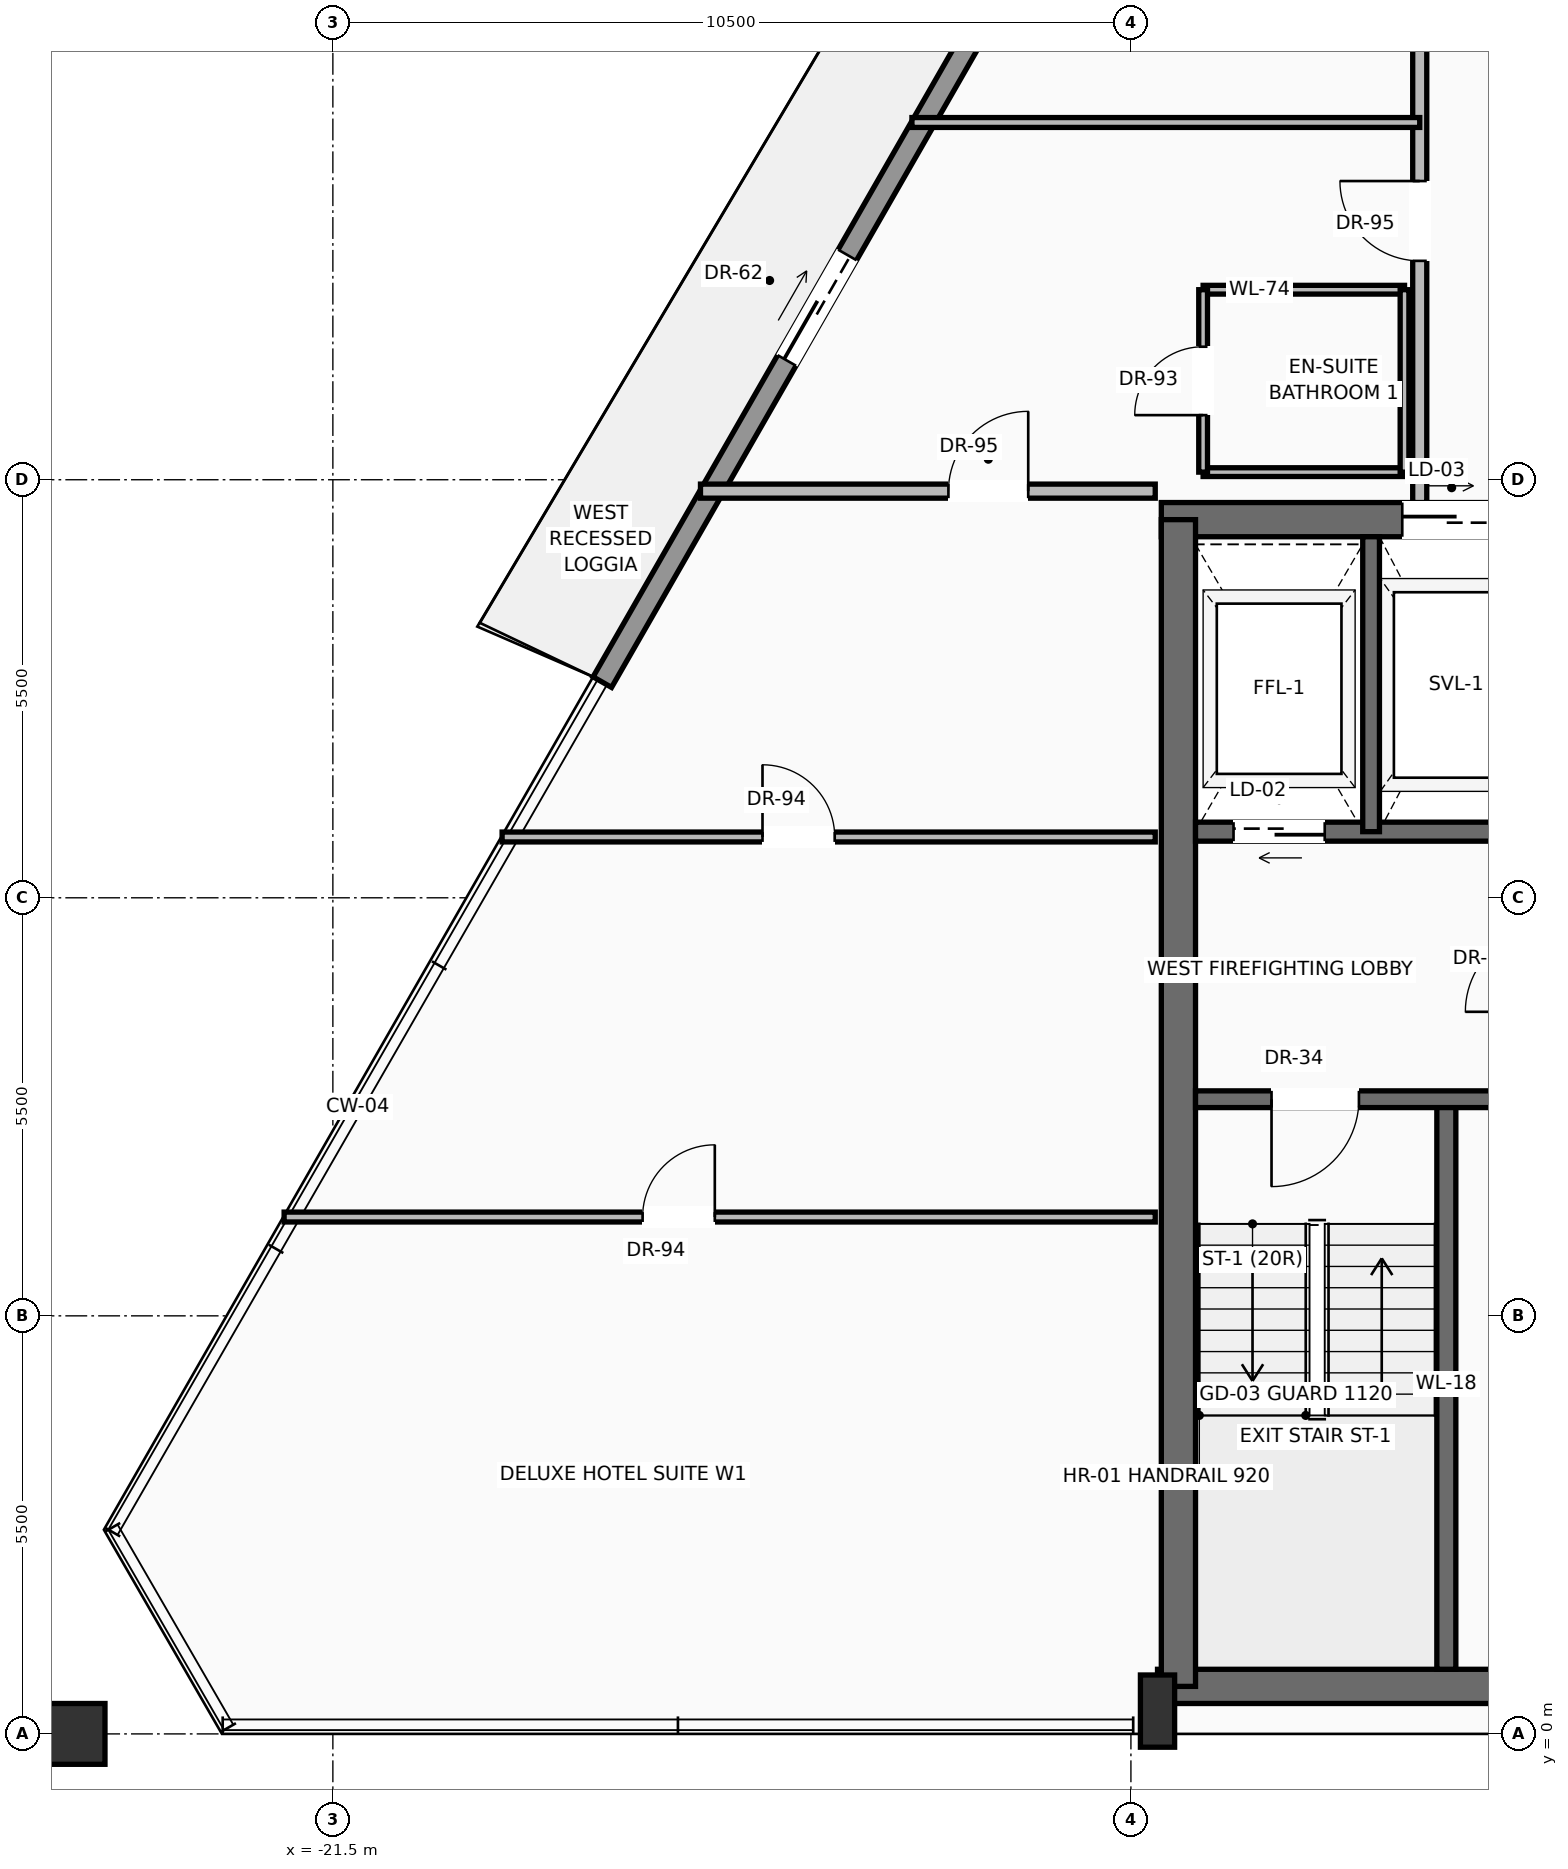
"""IFC4 building model, lengths in metres.
Left out: names, types, materials, properties, quantities, classifications, styles, units other than length and angle.
Written with IfcOpenShell. Run it as: python <this file> out.ifc"""

import sys

from ifc_helpers import new_model, si_unit, direction, frame, frame_2d, origin, origin_2d, place, context, subcontext, project, spatial, rectangle, hollow_rectangle, extrude, source, transform, mapped, element, fill, save


model = new_model("IFC4")
c1 = context("Model", 3, precision=1e-05, world=origin(), true_north=direction((0.0, 1.0)))
c2 = subcontext(c1, "Body", "Model", "MODEL_VIEW")
j1 = project(units=[si_unit("LENGTHUNIT", "METRE"), si_unit("PLANEANGLEUNIT", "RADIAN")], contexts=[c1])
p1 = place(None, origin())
s1 = spatial("IfcSite", under=j1, at=p1, CompositionType="ELEMENT")
p2 = place(p1, origin())
s2 = spatial("IfcBuilding", under=s1, at=p2, CompositionType="ELEMENT")
p3 = place(p2, frame((0.0, 0.0, 293.7)))
s3 = spatial("IfcBuildingStorey", under=s2, at=p3, CompositionType="ELEMENT", Elevation=293.7)
p4 = place(p3, frame((-10.65, 0.625, 0.0), z_axis=(0.0, 0.0, 1.0), x_axis=(1.0, 0.0, 0.0)))
e1 = element("IfcWall", 1, at=p4, inside=s3, PredefinedType="SHEAR", context=c2, shape_type="SweptSolid", body=[
    extrude(rectangle(XDim=21.3, YDim=0.45, at=frame_2d((10.65, 0.0))), origin(), (0.0, 0.0, 1.0), 3.24),
])
p5 = place(p3, frame((-10.6, 15.975, 0.0), z_axis=(0.0, 0.0, 1.0), x_axis=(1.0, 0.0, 0.0)))
e2 = element("IfcWall", 2, at=p5, inside=s3, PredefinedType="SHEAR", context=c2, shape_type="SweptSolid", body=[
    extrude(rectangle(XDim=21.2, YDim=0.45, at=frame_2d((10.6, 0.0))), origin(), (0.0, 0.0, 1.0), 3.24),
])
p6 = place(p5, frame((3.17, 0.0, 0.0)))
e3 = element("IfcOpeningElement", 3, at=p6, cuts=e2, PredefinedType="OPENING", context=c2, shape_type="SweptSolid", body=[
    extrude(rectangle(XDim=1.3, YDim=2.3, at=frame_2d((0.65, 1.15))), frame((0.0, 0.235, 0.0), z_axis=(0.0, -1.0, 0.0), x_axis=(1.0, 0.0, 0.0)), (0.0, 0.0, 1.0), 0.47),
])
p7 = place(p5, frame((9.6, 0.0, 0.0)))
e4 = element("IfcOpeningElement", 4, at=p7, cuts=e2, PredefinedType="OPENING", context=c2, shape_type="SweptSolid", body=[
    extrude(rectangle(XDim=2.0, YDim=2.4, at=frame_2d((1.0, 1.2))), frame((0.0, 0.235, 0.0), z_axis=(0.0, -1.0, 0.0), x_axis=(1.0, 0.0, 0.0)), (0.0, 0.0, 1.0), 0.47),
])
p8 = place(p3, frame((-10.375, 0.625, 0.0), z_axis=(0.0, 0.0, 1.0), x_axis=(0.0, 1.0, 0.0)))
e5 = element("IfcWall", 5, at=p8, inside=s3, PredefinedType="SHEAR", context=c2, shape_type="SweptSolid", body=[
    extrude(rectangle(XDim=15.35, YDim=0.45, at=frame_2d((7.675, 0.0))), origin(), (0.0, 0.0, 1.0), 3.24),
])
m1 = source(origin(), c2, "Body", "SweptSolid", [
    extrude(rectangle(XDim=0.45, YDim=0.95, at=origin_2d()), origin(), (0.0, 0.0, 1.0), 3.45),
])
p9 = place(p3, frame((-10.65, 0.3, 0.0), z_axis=(0.0, 0.0, 1.0), x_axis=(1.0, 0.0, 0.0)))
e6 = element("IfcColumn", 6, at=p9, inside=s3, PredefinedType="PILASTER", context=c2, shape_type="MappedRepresentation", body=[
    mapped(m1, transform((0.0, 0.0, 0.0), scale=1.0)),
])
m2 = source(origin(), c2, "Body", "SweptSolid", [
    extrude(hollow_rectangle(XDim=0.8, YDim=0.8, WallThickness=0.04, at=origin_2d()), origin(), (0.0, 0.0, 1.0), 3.441),
])
p10 = place(p3, frame((-24.898, 0.0, 0.004), z_axis=(0.003050713012, 0.0, 0.999995346564), x_axis=(0.0, 1.0, 0.0)))
e7 = element("IfcColumn", 7, at=p10, inside=s3, PredefinedType="COLUMN", context=c2, shape_type="MappedRepresentation", body=[
    mapped(m2, transform((0.0, 0.0, 0.0), scale=1.0)),
])
m3 = source(origin(), c2, "Body", "SweptSolid", [
    extrude(hollow_rectangle(XDim=0.8, YDim=0.8, WallThickness=0.04, at=origin_2d()), origin(), (0.0, 0.0, 1.0), 3.442),
])
p11 = place(p3, frame((-25.74, 1.407, 0.004), z_axis=(0.013831591838, -0.016030460285, 0.999775830579), x_axis=(0.757124238774, 0.653270913986, 0.0)))
e8 = element("IfcColumn", 8, at=p11, inside=s3, PredefinedType="COLUMN", context=c2, shape_type="MappedRepresentation", body=[
    mapped(m3, transform((0.0, 0.0, 0.0), scale=1.0)),
])
p12 = place(p3, frame((-17.955, 13.837, 0.0), z_axis=(0.0, 0.0, 1.0), x_axis=(0.49757006288, 0.867423790616, 0.0)))
e9 = element("IfcWall", 9, at=p12, inside=s3, PredefinedType="SOLIDWALL", context=c2, shape_type="SweptSolid", body=[
    extrude(rectangle(XDim=20.328, YDim=0.28, at=frame_2d((10.164, 0.0))), origin(), (0.0, 0.0, 1.0), 2.82),
])
p13 = place(p12, frame((4.879, 0.0, 0.0)))
e10 = element("IfcOpeningElement", 10, at=p13, cuts=e9, PredefinedType="OPENING", context=c2, shape_type="SweptSolid", body=[
    extrude(rectangle(XDim=1.6, YDim=2.35, at=frame_2d((0.8, 1.175))), frame((0.0, 0.15, 0.0), z_axis=(0.0, -1.0, 0.0), x_axis=(1.0, 0.0, 0.0)), (0.0, 0.0, 1.0), 0.3),
])
p14 = place(p12, frame((13.823, 0.0, 0.9)))
e11 = element("IfcOpeningElement", 11, at=p14, cuts=e9, PredefinedType="OPENING", context=c2, shape_type="SweptSolid", body=[
    extrude(rectangle(XDim=1.55, YDim=1.75, at=frame_2d((0.775, 0.875))), frame((0.0, 0.15, 0.0), z_axis=(0.0, -1.0, 0.0), x_axis=(1.0, 0.0, 0.0)), (0.0, 0.0, 1.0), 0.3),
])
p15 = place(p3, frame((-6.85, 0.85, 0.0), z_axis=(0.0, 0.0, 1.0), x_axis=(0.0, 1.0, 0.0)))
e12 = element("IfcWall", 12, at=p15, inside=s3, PredefinedType="SOLIDWALL", context=c2, shape_type="SweptSolid", body=[
    extrude(rectangle(XDim=7.5, YDim=0.25, at=frame_2d((3.75, 0.0))), origin(), (0.0, 0.0, 1.0), 3.24),
])
p16 = place(p3, frame((-5.5, 8.35, 0.0), z_axis=(0.0, 0.0, 1.0), x_axis=(-1.0, 0.0, 0.0)))
e13 = element("IfcWall", 13, at=p16, inside=s3, PredefinedType="SOLIDWALL", context=c2, shape_type="SweptSolid", body=[
    extrude(rectangle(XDim=4.65, YDim=0.22, at=frame_2d((2.325, 0.0))), origin(), (0.0, 0.0, 1.0), 3.24),
])
p17 = place(p16, frame((2.5, 0.0, 0.0)))
e14 = element("IfcOpeningElement", 14, at=p17, cuts=e13, PredefinedType="OPENING", context=c2, shape_type="SweptSolid", body=[
    extrude(rectangle(XDim=1.15, YDim=2.2, at=frame_2d((0.575, 1.1))), frame((0.0, 0.12, 0.0), z_axis=(0.0, -1.0, 0.0), x_axis=(1.0, 0.0, 0.0)), (0.0, 0.0, 1.0), 0.24),
])
p18 = place(p3, frame((-5.5, 11.87, 0.0), z_axis=(0.0, 0.0, 1.0), x_axis=(-1.0, 0.0, 0.0)))
e15 = element("IfcWall", 15, at=p18, inside=s3, PredefinedType="SOLIDWALL", context=c2, shape_type="SweptSolid", body=[
    extrude(rectangle(XDim=4.65, YDim=0.25, at=frame_2d((2.325, 0.0))), origin(), (0.0, 0.0, 1.0), 3.24),
])
p19 = place(p18, frame((2.95, 0.0, 0.0)))
e16 = element("IfcOpeningElement", 16, at=p19, cuts=e15, PredefinedType="OPENING", context=c2, shape_type="SweptSolid", body=[
    extrude(rectangle(XDim=1.2, YDim=2.25, at=frame_2d((0.6, 1.125))), frame((0.0, 0.135, 0.0), z_axis=(0.0, -1.0, 0.0), x_axis=(1.0, 0.0, 0.0)), (0.0, 0.0, 1.0), 0.27),
])
p20 = place(p3, frame((-7.84, 11.87, 0.0), z_axis=(0.0, 0.0, 1.0), x_axis=(0.0, 1.0, 0.0)))
e17 = element("IfcWall", 17, at=p20, inside=s3, PredefinedType="SOLIDWALL", context=c2, shape_type="SweptSolid", body=[
    extrude(rectangle(XDim=3.88, YDim=0.22, at=frame_2d((1.94, 0.0))), origin(), (0.0, 0.0, 1.0), 3.24),
])
p21 = place(p3, frame((-7.2, 16.2, 0.0), z_axis=(0.0, 0.0, 1.0), x_axis=(0.0, 1.0, 0.0)))
e18 = element("IfcWall", 18, at=p21, inside=s3, PredefinedType="PARTITIONING", context=c2, shape_type="SweptSolid", body=[
    extrude(rectangle(XDim=10.4, YDim=0.185, at=frame_2d((5.2, 0.0))), origin(), (0.0, 0.0, 1.0), 3.232),
])
p22 = place(p21, frame((3.18, 0.0, 0.0)))
e19 = element("IfcOpeningElement", 19, at=p22, cuts=e18, PredefinedType="OPENING", context=c2, shape_type="SweptSolid", body=[
    extrude(rectangle(XDim=1.05, YDim=2.25, at=frame_2d((0.525, 1.125))), frame((0.0, 0.103, 0.0), z_axis=(0.0, -1.0, 0.0), x_axis=(1.0, 0.0, 0.0)), (0.0, 0.0, 1.0), 0.205),
])
p23 = place(p21, frame((7.712, 0.0, 0.0)))
e20 = element("IfcOpeningElement", 20, at=p23, cuts=e18, PredefinedType="OPENING", context=c2, shape_type="SweptSolid", body=[
    extrude(rectangle(XDim=1.05, YDim=2.25, at=frame_2d((0.525, 1.125))), frame((0.0, 0.103, 0.0), z_axis=(0.0, -1.0, 0.0), x_axis=(1.0, 0.0, 0.0)), (0.0, 0.0, 1.0), 0.205),
])
p24 = place(p3, frame((-16.663, 16.35, 0.0), z_axis=(0.0, 0.0, 1.0), x_axis=(1.0, 0.0, 0.0)))
e21 = element("IfcWall", 21, at=p24, inside=s3, PredefinedType="PARTITIONING", context=c2, shape_type="SweptSolid", body=[
    extrude(rectangle(XDim=5.983, YDim=0.185, at=frame_2d((2.992, 0.0))), origin(), (0.0, 0.0, 1.0), 3.232),
])
p25 = place(p24, frame((3.262, 0.0, 0.0)))
e22 = element("IfcOpeningElement", 22, at=p25, cuts=e21, PredefinedType="OPENING", context=c2, shape_type="SweptSolid", body=[
    extrude(rectangle(XDim=1.05, YDim=2.25, at=frame_2d((0.525, 1.125))), frame((0.0, 0.103, 0.0), z_axis=(0.0, -1.0, 0.0), x_axis=(1.0, 0.0, 0.0)), (0.0, 0.0, 1.0), 0.205),
])
p26 = place(p3, frame((-22.141, 6.8, 0.0), z_axis=(0.0, 0.0, 1.0), x_axis=(1.0, 0.0, 0.0)))
e23 = element("IfcWall", 23, at=p26, inside=s3, PredefinedType="PARTITIONING", context=c2, shape_type="SweptSolid", body=[
    extrude(rectangle(XDim=11.461, YDim=0.13, at=frame_2d((5.731, 0.0))), origin(), (0.0, 0.0, 1.0), 3.232),
])
p27 = place(p26, frame((4.717, 0.0, 0.0)))
e24 = element("IfcOpeningElement", 24, at=p27, cuts=e23, PredefinedType="OPENING", context=c2, shape_type="SweptSolid", body=[
    extrude(rectangle(XDim=0.95, YDim=2.2, at=frame_2d((0.475, 1.1))), frame((0.0, 0.075, 0.0), z_axis=(0.0, -1.0, 0.0), x_axis=(1.0, 0.0, 0.0)), (0.0, 0.0, 1.0), 0.15),
])
p28 = place(p3, frame((-19.273, 11.8, 0.0), z_axis=(0.0, 0.0, 1.0), x_axis=(1.0, 0.0, 0.0)))
e25 = element("IfcWall", 25, at=p28, inside=s3, PredefinedType="PARTITIONING", context=c2, shape_type="SweptSolid", body=[
    extrude(rectangle(XDim=8.593, YDim=0.13, at=frame_2d((4.297, 0.0))), origin(), (0.0, 0.0, 1.0), 3.232),
])
p29 = place(p28, frame((3.426, 0.0, 0.0)))
e26 = element("IfcOpeningElement", 26, at=p29, cuts=e25, PredefinedType="OPENING", context=c2, shape_type="SweptSolid", body=[
    extrude(rectangle(XDim=0.95, YDim=2.2, at=frame_2d((0.475, 1.1))), frame((0.0, 0.075, 0.0), z_axis=(0.0, -1.0, 0.0), x_axis=(1.0, 0.0, 0.0)), (0.0, 0.0, 1.0), 0.15),
])
for number, where, z_axis, x_axis in (
    (27, (-10.05, 16.6, 0.0), (0.0, 0.0, 1.0), (1.0, 0.0, 0.0)),
    (28, (-10.05, 19.0, 0.0), (0.0, 0.0, 1.0), (1.0, 0.0, 0.0)),
):
    element("IfcWall", number, at=place(p3, frame(where, z_axis=z_axis, x_axis=x_axis)), inside=s3, PredefinedType="PARTITIONING", context=c2, shape_type="SweptSolid", body=[
        extrude(rectangle(XDim=2.65, YDim=0.115, at=frame_2d((1.325, 0.0))), origin(), (0.0, 0.0, 1.0), 3.232),
    ])
p30 = place(p3, frame((-10.05, 16.6, 0.0), z_axis=(0.0, 0.0, 1.0), x_axis=(0.0, 1.0, 0.0)))
e29 = element("IfcWall", 29, at=p30, inside=s3, PredefinedType="PARTITIONING", context=c2, shape_type="SweptSolid", body=[
    extrude(rectangle(XDim=2.4, YDim=0.115, at=frame_2d((1.2, 0.0))), origin(), (0.0, 0.0, 1.0), 3.232),
])
p31 = place(p30, frame((0.75, 0.0, 0.0)))
e30 = element("IfcOpeningElement", 30, at=p31, cuts=e29, PredefinedType="OPENING", context=c2, shape_type="SweptSolid", body=[
    extrude(rectangle(XDim=0.9, YDim=2.15, at=frame_2d((0.45, 1.075))), frame((0.0, 0.067, 0.0), z_axis=(0.0, -1.0, 0.0), x_axis=(1.0, 0.0, 0.0)), (0.0, 0.0, 1.0), 0.135),
])
p32 = place(p3, frame((-7.4, 16.6, 0.0), z_axis=(0.0, 0.0, 1.0), x_axis=(0.0, 1.0, 0.0)))
e31 = element("IfcWall", 31, at=p32, inside=s3, PredefinedType="PARTITIONING", context=c2, shape_type="SweptSolid", body=[
    extrude(rectangle(XDim=2.4, YDim=0.115, at=frame_2d((1.2, 0.0))), origin(), (0.0, 0.0, 1.0), 3.232),
])
p33 = place(p3, frame((-13.881, 21.2, 0.0), z_axis=(0.0, 0.0, 1.0), x_axis=(1.0, 0.0, 0.0)))
e32 = element("IfcWall", 32, at=p33, inside=s3, PredefinedType="PARTITIONING", context=c2, shape_type="SweptSolid", body=[
    extrude(rectangle(XDim=6.681, YDim=0.13, at=frame_2d((3.341, 0.0))), origin(), (0.0, 0.0, 1.0), 3.232),
])
m4 = source(origin(), c2, "Body", "SweptSolid", [
    extrude(rectangle(XDim=1.6, YDim=2.35, at=frame_2d((0.8, 1.175))), frame((0.0, 0.025, 0.0), z_axis=(0.0, -1.0, 0.0), x_axis=(1.0, 0.0, 0.0)), (0.0, 0.0, 1.0), 0.05),
])
p34 = place(p13, origin())
e33 = element("IfcDoor", 33, at=p34, inside=s3, OperationType="SLIDING_TO_LEFT", PredefinedType="DOOR", context=c2, shape_type="MappedRepresentation", body=[
    mapped(m4, transform((0.0, 0.0, 0.0), scale=1.0)),
])
fill(e10, e33)
m5 = source(origin(), c2, "Body", "SweptSolid", [
    extrude(rectangle(XDim=1.15, YDim=2.2, at=frame_2d((0.575, 1.1))), frame((0.0, 0.025, 0.0), z_axis=(0.0, -1.0, 0.0), x_axis=(1.0, 0.0, 0.0)), (0.0, 0.0, 1.0), 0.05),
])
p35 = place(p17, origin())
e34 = element("IfcDoor", 34, at=p35, inside=s3, OperationType="SINGLE_SWING_RIGHT", PredefinedType="DOOR", context=c2, shape_type="MappedRepresentation", body=[
    mapped(m5, transform((0.0, 0.0, 0.0), scale=1.0)),
])
fill(e14, e34)
m6 = source(origin(), c2, "Body", "SweptSolid", [
    extrude(rectangle(XDim=1.2, YDim=2.25, at=frame_2d((0.6, 1.125))), frame((0.0, 0.025, 0.0), z_axis=(0.0, -1.0, 0.0), x_axis=(1.0, 0.0, 0.0)), (0.0, 0.0, 1.0), 0.05),
])
p36 = place(p19, origin())
e35 = element("IfcDoor", 35, at=p36, inside=s3, OperationType="SLIDING_TO_LEFT", PredefinedType="DOOR", context=c2, shape_type="MappedRepresentation", body=[
    mapped(m6, transform((0.0, 0.0, 0.0), scale=1.0)),
])
fill(e16, e35)
m7 = source(origin(), c2, "Body", "SweptSolid", [
    extrude(rectangle(XDim=1.3, YDim=2.3, at=frame_2d((0.65, 1.15))), frame((0.0, 0.025, 0.0), z_axis=(0.0, -1.0, 0.0), x_axis=(1.0, 0.0, 0.0)), (0.0, 0.0, 1.0), 0.05),
])
p37 = place(p6, origin())
e36 = element("IfcDoor", 36, at=p37, inside=s3, OperationType="SLIDING_TO_RIGHT", PredefinedType="DOOR", context=c2, shape_type="MappedRepresentation", body=[
    mapped(m7, transform((0.0, 0.0, 0.0), scale=1.0)),
])
fill(e3, e36)
m8 = source(origin(), c2, "Body", "SweptSolid", [
    extrude(rectangle(XDim=1.05, YDim=2.25, at=frame_2d((0.525, 1.125))), frame((0.0, 0.025, 0.0), z_axis=(0.0, -1.0, 0.0), x_axis=(1.0, 0.0, 0.0)), (0.0, 0.0, 1.0), 0.05),
])
p38 = place(p25, origin())
e37 = element("IfcDoor", 37, at=p38, inside=s3, OperationType="SINGLE_SWING_RIGHT", PredefinedType="DOOR", context=c2, shape_type="MappedRepresentation", body=[
    mapped(m8, transform((0.0, 0.0, 0.0), scale=1.0)),
])
fill(e22, e37)
m9 = source(origin(), c2, "Body", "SweptSolid", [
    extrude(rectangle(XDim=0.95, YDim=2.2, at=frame_2d((0.475, 1.1))), frame((0.0, 0.025, 0.0), z_axis=(0.0, -1.0, 0.0), x_axis=(1.0, 0.0, 0.0)), (0.0, 0.0, 1.0), 0.05),
])
p39 = place(p27, origin())
e38 = element("IfcDoor", 38, at=p39, inside=s3, OperationType="SINGLE_SWING_RIGHT", PredefinedType="DOOR", context=c2, shape_type="MappedRepresentation", body=[
    mapped(m9, transform((0.0, 0.0, 0.0), scale=1.0)),
])
fill(e24, e38)
p40 = place(p29, origin())
e39 = element("IfcDoor", 39, at=p40, inside=s3, OperationType="SINGLE_SWING_LEFT", PredefinedType="DOOR", context=c2, shape_type="MappedRepresentation", body=[
    mapped(m9, transform((0.0, 0.0, 0.0), scale=1.0)),
])
fill(e26, e39)
p41 = place(p22, origin())
e40 = element("IfcDoor", 40, at=p41, inside=s3, OperationType="SINGLE_SWING_RIGHT", PredefinedType="DOOR", context=c2, shape_type="MappedRepresentation", body=[
    mapped(m8, transform((0.0, 0.0, 0.0), scale=1.0)),
])
fill(e19, e40)
m10 = source(origin(), c2, "Body", "SweptSolid", [
    extrude(rectangle(XDim=0.9, YDim=2.15, at=frame_2d((0.45, 1.075))), frame((0.0, 0.025, 0.0), z_axis=(0.0, -1.0, 0.0), x_axis=(1.0, 0.0, 0.0)), (0.0, 0.0, 1.0), 0.05),
])
p42 = place(p31, origin())
e41 = element("IfcDoor", 41, at=p42, inside=s3, OperationType="SINGLE_SWING_LEFT", PredefinedType="DOOR", context=c2, shape_type="MappedRepresentation", body=[
    mapped(m10, transform((0.0, 0.0, 0.0), scale=1.0)),
])
fill(e30, e41)
save(model, sys.argv[1])
